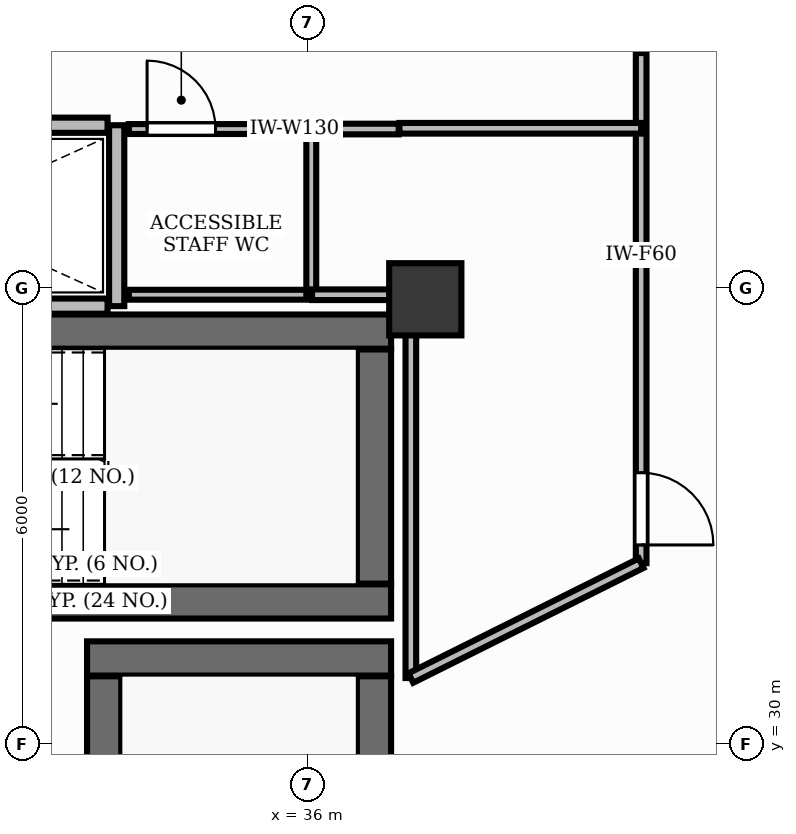
"""IFC4 building model, lengths in metres.
Left out: names, types, materials, properties, quantities, classifications, styles, units other than length and angle.
Written with IfcOpenShell. Run it as: python <this file> out.ifc"""

import sys

from ifc_helpers import new_model, si_unit, direction, frame, frame_2d, origin, origin_2d, place, context, subcontext, project, spatial, rectangle, extrude, element, fill, save


model = new_model("IFC4")
c1 = context("Model", 3, precision=1e-05, world=origin(), true_north=direction((0.0, 1.0)))
c2 = subcontext(c1, "Body", "Model", "MODEL_VIEW")
j1 = project(units=[si_unit("LENGTHUNIT", "METRE"), si_unit("PLANEANGLEUNIT", "RADIAN")], contexts=[c1])
p1 = place(None, origin())
s1 = spatial("IfcSite", under=j1, at=p1, CompositionType="ELEMENT")
p2 = place(p1, origin())
s2 = spatial("IfcBuilding", under=s1, at=p2, CompositionType="ELEMENT")
p3 = place(p2, frame((0.0, 0.0, 140.4)))
s3 = spatial("IfcBuildingStorey", under=s2, at=p3, CompositionType="ELEMENT", Elevation=140.4)
p4 = place(p3, frame((28.852, 35.425, 0.0), z_axis=(0.0, 0.0, 1.0), x_axis=(1.0, 0.0, 0.0)))
e1 = element("IfcWall", 1, at=p4, inside=s3, PredefinedType="SHEAR", context=c2, shape_type="SweptSolid", body=[
    extrude(rectangle(XDim=8.248, YDim=0.45, at=frame_2d((4.124, 0.0))), origin(), (0.0, 0.0, 1.0), 3.9),
])
p5 = place(p3, frame((28.35, 31.875, 0.0), z_axis=(0.0, 0.0, 1.0), x_axis=(1.0, 0.0, 0.0)))
e2 = element("IfcWall", 2, at=p5, inside=s3, PredefinedType="SHEAR", context=c2, shape_type="SweptSolid", body=[
    extrude(rectangle(XDim=8.75, YDim=0.45, at=frame_2d((4.375, 0.0))), origin(), (0.0, 0.0, 1.0), 3.9),
])
p6 = place(p3, frame((36.875, 32.11, 0.0), z_axis=(0.0, 0.0, 1.0), x_axis=(0.0, 1.0, 0.0)))
e3 = element("IfcWall", 3, at=p6, inside=s3, PredefinedType="SHEAR", context=c2, shape_type="SweptSolid", body=[
    extrude(rectangle(XDim=3.08, YDim=0.45, at=frame_2d((1.54, 0.0))), origin(), (0.0, 0.0, 1.0), 3.9),
])
p7 = place(p3, frame((33.1, 31.125, 0.0), z_axis=(0.0, 0.0, 1.0), x_axis=(1.0, 0.0, 0.0)))
e4 = element("IfcWall", 4, at=p7, inside=s3, PredefinedType="SHEAR", context=c2, shape_type="SweptSolid", body=[
    extrude(rectangle(XDim=4.0, YDim=0.45, at=frame_2d((2.0, 0.0))), origin(), (0.0, 0.0, 1.0), 3.9),
])
p8 = place(p3, frame((36.875, 23.11, 0.0), z_axis=(0.0, 0.0, 1.0), x_axis=(0.0, 1.0, 0.0)))
e5 = element("IfcWall", 5, at=p8, inside=s3, PredefinedType="SHEAR", context=c2, shape_type="SweptSolid", body=[
    extrude(rectangle(XDim=7.78, YDim=0.45, at=frame_2d((3.89, 0.0))), origin(), (0.0, 0.0, 1.0), 3.9),
])
p9 = place(p3, frame((33.325, 23.11, 0.0), z_axis=(0.0, 0.0, 1.0), x_axis=(0.0, 1.0, 0.0)))
e6 = element("IfcWall", 6, at=p9, inside=s3, PredefinedType="SHEAR", context=c2, shape_type="SweptSolid", body=[
    extrude(rectangle(XDim=7.78, YDim=0.45, at=frame_2d((3.89, 0.0))), origin(), (0.0, 0.0, 1.0), 3.9),
])
p10 = place(p9, frame((0.2, 0.0, 0.0)))
e7 = element("IfcOpeningElement", 7, at=p10, cuts=e6, PredefinedType="OPENING", context=c2, shape_type="SweptSolid", body=[
    extrude(rectangle(XDim=1.05, YDim=2.15, at=frame_2d((0.525, 1.075))), frame((0.0, 0.24, 0.0), z_axis=(0.0, -1.0, 0.0), x_axis=(1.0, 0.0, 0.0)), (0.0, 0.0, 1.0), 0.48),
])
p11 = place(p3, frame((37.55, 35.85, -0.0), z_axis=(0.0, 0.0, 1.0), x_axis=(1.0, 0.0, 0.0)))
e8 = element("IfcColumn", 8, at=p11, inside=s3, PredefinedType="PILASTER", context=c2, shape_type="SweptSolid", body=[
    extrude(rectangle(XDim=0.95, YDim=0.95, at=origin_2d()), origin(), (0.0, 0.0, 1.0), 3.901),
])
p12 = place(p3, frame((33.49, 35.76, 0.0), z_axis=(0.0, 0.0, 1.0), x_axis=(0.0, 1.0, 0.0)))
e9 = element("IfcWall", 9, at=p12, inside=s3, PredefinedType="PARTITIONING", context=c2, shape_type="SweptSolid", body=[
    extrude(rectangle(XDim=2.38, YDim=0.2, at=frame_2d((1.19, 0.0))), origin(), (0.0, 0.0, 1.0), 2.91),
])
for number, where, z_axis, x_axis in (
    (10, (28.8, 35.76, 0.0), (0.0, 0.0, 1.0), (1.0, 0.0, 0.0)),
    (11, (28.8, 38.14, 0.0), (0.0, 0.0, 1.0), (1.0, 0.0, 0.0)),
):
    element("IfcWall", number, at=place(p3, frame(where, z_axis=z_axis, x_axis=x_axis)), inside=s3, PredefinedType="PARTITIONING", context=c2, shape_type="SweptSolid", body=[
        extrude(rectangle(XDim=4.57, YDim=0.2, at=frame_2d((2.285, 0.0))), origin(), (0.0, 0.0, 1.0), 2.91),
    ])
p13 = place(p3, frame((33.65, 38.09, 0.0), z_axis=(0.0, 0.0, 1.0), x_axis=(1.0, 0.0, 0.0)))
e12 = element("IfcWall", 12, at=p13, inside=s3, PredefinedType="PARTITIONING", context=c2, shape_type="SweptSolid", body=[
    extrude(rectangle(XDim=2.4, YDim=0.13, at=frame_2d((1.2, 0.0))), origin(), (0.0, 0.0, 1.0), 2.91),
])
p14 = place(p13, frame((0.24, 0.0, 0.0)))
e13 = element("IfcOpeningElement", 13, at=p14, cuts=e12, PredefinedType="OPENING", context=c2, shape_type="SweptSolid", body=[
    extrude(rectangle(XDim=0.9, YDim=2.15, at=frame_2d((0.45, 1.075))), frame((0.0, 0.08, 0.0), z_axis=(0.0, -1.0, 0.0), x_axis=(1.0, 0.0, 0.0)), (0.0, 0.0, 1.0), 0.16),
])
p15 = place(p3, frame((40.39, 39.09, 0.0), z_axis=(0.0, 0.0, 1.0), x_axis=(0.0, -1.0, 0.0)))
e14 = element("IfcWall", 14, at=p15, inside=s3, PredefinedType="PARTITIONING", context=c2, shape_type="SweptSolid", body=[
    extrude(rectangle(XDim=6.712, YDim=0.14, at=frame_2d((3.356, 0.0))), origin(), (0.0, 0.0, 1.0), 2.91),
])
p16 = place(p15, frame((5.522, 0.0, 0.0)))
e15 = element("IfcOpeningElement", 15, at=p16, cuts=e14, PredefinedType="OPENING", context=c2, shape_type="SweptSolid", body=[
    extrude(rectangle(XDim=0.95, YDim=2.15, at=frame_2d((0.475, 1.075))), frame((0.0, 0.085, 0.0), z_axis=(0.0, -1.0, 0.0), x_axis=(1.0, 0.0, 0.0)), (0.0, 0.0, 1.0), 0.17),
])
p17 = place(p3, frame((36.05, 35.91, 0.0), z_axis=(0.0, 0.0, 1.0), x_axis=(-1.0, 0.0, 0.0)))
e16 = element("IfcWall", 16, at=p17, inside=s3, PredefinedType="PARTITIONING", context=c2, shape_type="SweptSolid", body=[
    extrude(rectangle(XDim=2.4, YDim=0.13, at=frame_2d((1.2, 0.0))), origin(), (0.0, 0.0, 1.0), 2.91),
])
p18 = place(p3, frame((36.05, 38.09, 0.0), z_axis=(0.0, 0.0, 1.0), x_axis=(0.0, -1.0, 0.0)))
e17 = element("IfcWall", 17, at=p18, inside=s3, PredefinedType="PARTITIONING", context=c2, shape_type="SweptSolid", body=[
    extrude(rectangle(XDim=2.18, YDim=0.13, at=frame_2d((1.09, 0.0))), origin(), (0.0, 0.0, 1.0), 2.91),
])
p19 = place(p3, frame((37.36, 30.867, 0.0), z_axis=(0.0, 0.0, 1.0), x_axis=(0.0, 1.0, 0.0)))
e18 = element("IfcWall", 18, at=p19, inside=s3, PredefinedType="PARTITIONING", context=c2, shape_type="SweptSolid", body=[
    extrude(rectangle(XDim=5.032, YDim=0.14, at=frame_2d((2.516, 0.0))), origin(), (0.0, 0.0, 1.0), 2.91),
])
p20 = place(p3, frame((37.35, 35.91, 0.0), z_axis=(0.0, 0.0, 1.0), x_axis=(-1.0, 0.0, 0.0)))
e19 = element("IfcWall", 19, at=p20, inside=s3, PredefinedType="PARTITIONING", context=c2, shape_type="SweptSolid", body=[
    extrude(rectangle(XDim=1.29, YDim=0.14, at=frame_2d((0.645, 0.0))), origin(), (0.0, 0.0, 1.0), 2.91),
])
p21 = place(p3, frame((36.06, 38.09, 0.0), z_axis=(0.0, 0.0, 1.0), x_axis=(1.0, 0.0, 0.0)))
e20 = element("IfcWall", 20, at=p21, inside=s3, PredefinedType="PARTITIONING", context=c2, shape_type="SweptSolid", body=[
    extrude(rectangle(XDim=1.14, YDim=0.14, at=frame_2d((0.57, 0.0))), origin(), (0.0, 0.0, 1.0), 2.91),
])
p22 = place(p3, frame((37.21, 38.1, 0.0), z_axis=(0.0, 0.0, 1.0), x_axis=(1.0, 0.0, 0.0)))
e21 = element("IfcWall", 21, at=p22, inside=s3, PredefinedType="PARTITIONING", context=c2, shape_type="SweptSolid", body=[
    extrude(rectangle(XDim=3.18, YDim=0.14, at=frame_2d((1.59, 0.0))), origin(), (0.0, 0.0, 1.0), 2.91),
])
p23 = place(p3, frame((40.39, 32.378, 0.0), z_axis=(0.0, 0.0, 1.0), x_axis=(-0.894917018808, -0.44623259568, 0.0)))
e22 = element("IfcWall", 22, at=p23, inside=s3, PredefinedType="PARTITIONING", context=c2, shape_type="SweptSolid", body=[
    extrude(rectangle(XDim=3.385, YDim=0.14, at=frame_2d((1.693, 0.0))), origin(), (0.0, 0.0, 1.0), 2.91),
])
p24 = place(p14, origin())
e23 = element("IfcDoor", 23, at=p24, inside=s3, OperationType="SINGLE_SWING_LEFT", PredefinedType="DOOR", context=c2, shape_type="SweptSolid", body=[
    extrude(rectangle(XDim=0.9, YDim=2.15, at=frame_2d((0.45, 1.075))), frame((0.0, 0.025, 0.0), z_axis=(0.0, -1.0, 0.0), x_axis=(1.0, 0.0, 0.0)), (0.0, 0.0, 1.0), 0.05),
])
fill(e13, e23)
p25 = place(p16, origin())
e24 = element("IfcDoor", 24, at=p25, inside=s3, OperationType="SINGLE_SWING_RIGHT", PredefinedType="DOOR", context=c2, shape_type="SweptSolid", body=[
    extrude(rectangle(XDim=0.95, YDim=2.15, at=frame_2d((0.475, 1.075))), frame((0.0, 0.025, 0.0), z_axis=(0.0, -1.0, 0.0), x_axis=(1.0, 0.0, 0.0)), (0.0, 0.0, 1.0), 0.05),
])
fill(e15, e24)
save(model, sys.argv[1])
